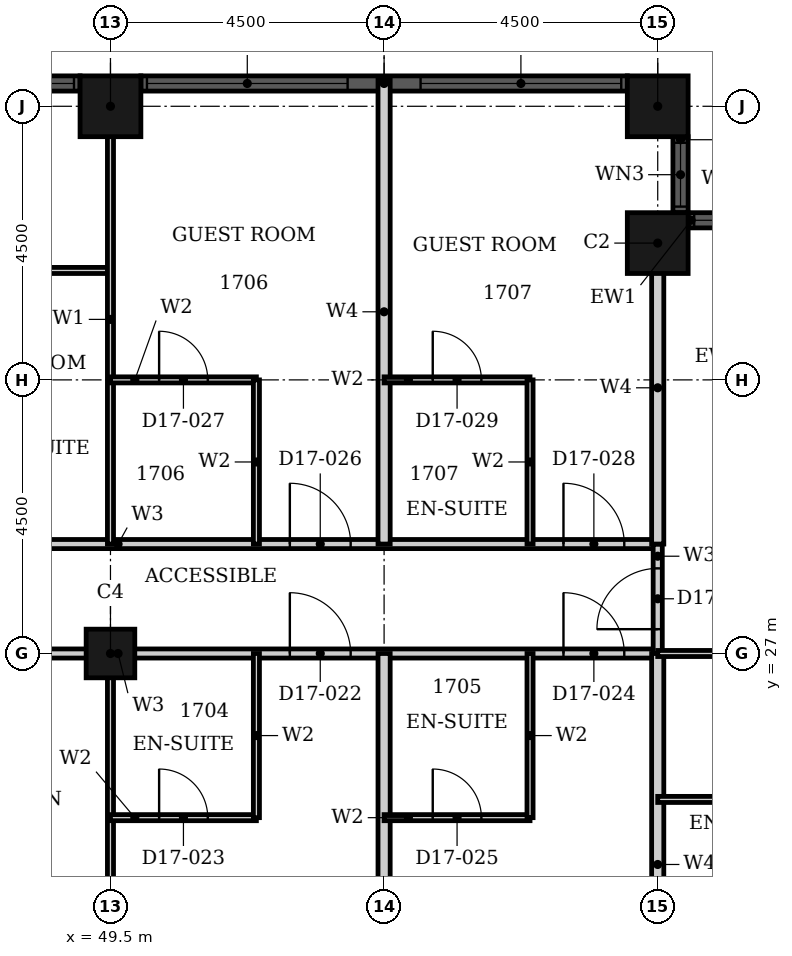
"""IFC4 building model, lengths in metres.
Left out: names, types, materials, properties, quantities, classifications, styles, units other than length and angle.
Written with IfcOpenShell. Run it as: python <this file> out.ifc"""

import sys

from ifc_helpers import new_model, si_unit, direction, frame, frame_2d, origin, origin_2d, place, context, subcontext, project, spatial, rectangle, hollow_rectangle, extrude, element, fill, save


model = new_model("IFC4")
c1 = context("Model", 3, precision=1e-05, world=origin(), true_north=direction((0.0, 1.0)))
c2 = subcontext(c1, "Body", "Model", "MODEL_VIEW")
j1 = project(units=[si_unit("LENGTHUNIT", "METRE"), si_unit("PLANEANGLEUNIT", "RADIAN")], contexts=[c1])
p1 = place(None, origin())
s1 = spatial("IfcSite", under=j1, at=p1, CompositionType="ELEMENT")
p2 = place(p1, origin())
s2 = spatial("IfcBuilding", under=s1, at=p2, CompositionType="ELEMENT")
p3 = place(p2, frame((0.0, 0.0, 74.4)))
s3 = spatial("IfcBuildingStorey", under=s2, at=p3, CompositionType="ELEMENT", Elevation=74.4)
for number, where, z_axis, x_axis in (
    (1, (58.5, 33.75, 0.0), (0.0, 0.0, 1.0), (1.0, 0.0, 0.0)),
    (2, (58.5, 36.0, 0.0), (0.0, 0.0, 1.0), (1.0, 0.0, 0.0)),
    (3, (49.5, 36.0, 0.0), (0.0, 0.0, 1.0), (1.0, 0.0, 0.0)),
):
    element("IfcColumn", number, at=place(p3, frame(where, z_axis=z_axis, x_axis=x_axis)), inside=s3, PredefinedType="COLUMN", context=c2, shape_type="SweptSolid", body=[
        extrude(hollow_rectangle(XDim=1.0, YDim=1.0, WallThickness=0.032, at=origin_2d()), origin(), (0.0, 0.0, 1.0), 3.6),
    ])
p4 = place(p3, frame((49.5, 27.0, 0.0), z_axis=(0.0, 0.0, 1.0), x_axis=(1.0, 0.0, 0.0)))
e4 = element("IfcColumn", 4, at=p4, inside=s3, PredefinedType="COLUMN", context=c2, shape_type="SweptSolid", body=[
    extrude(hollow_rectangle(XDim=0.8, YDim=0.8, WallThickness=0.025, at=origin_2d()), origin(), (0.0, 0.0, 1.0), 3.6),
])
p5 = place(p3, frame((60.25, 34.125, 0.0), z_axis=(0.0, 0.0, 1.0), x_axis=(-1.0, 0.0, 0.0)))
e5 = element("IfcWall", 5, at=p5, inside=s3, PredefinedType="SOLIDWALL", context=c2, shape_type="SweptSolid", body=[
    extrude(rectangle(XDim=1.25, YDim=0.25, at=frame_2d((0.625, 0.0))), origin(), (0.0, 0.0, 1.0), 3.6),
])
p6 = place(p5, frame((0.1, 0.0, 0.9)))
e6 = element("IfcOpeningElement", 6, at=p6, cuts=e5, PredefinedType="OPENING", context=c2, shape_type="SweptSolid", body=[
    extrude(rectangle(XDim=1.05, YDim=2.08, at=frame_2d((0.525, 1.04))), frame((0.0, 0.135, 0.0), z_axis=(0.0, -1.0, 0.0), x_axis=(1.0, 0.0, 0.0)), (0.0, 0.0, 1.0), 0.27),
])
p7 = place(p3, frame((58.875, 34.25, 0.0), z_axis=(0.0, 0.0, 1.0), x_axis=(0.0, 1.0, 0.0)))
e7 = element("IfcWall", 7, at=p7, inside=s3, PredefinedType="SOLIDWALL", context=c2, shape_type="SweptSolid", body=[
    extrude(rectangle(XDim=1.25, YDim=0.25, at=frame_2d((0.625, 0.0))), origin(), (0.0, 0.0, 1.0), 3.6),
])
p8 = place(p7, frame((0.1, 0.0, 0.9)))
e8 = element("IfcOpeningElement", 8, at=p8, cuts=e7, PredefinedType="OPENING", context=c2, shape_type="SweptSolid", body=[
    extrude(rectangle(XDim=1.05, YDim=2.08, at=frame_2d((0.525, 1.04))), frame((0.0, 0.135, 0.0), z_axis=(0.0, -1.0, 0.0), x_axis=(1.0, 0.0, 0.0)), (0.0, 0.0, 1.0), 0.27),
])
p9 = place(p3, frame((58.0, 36.375, 0.0), z_axis=(0.0, 0.0, 1.0), x_axis=(-1.0, 0.0, 0.0)))
e9 = element("IfcWall", 9, at=p9, inside=s3, PredefinedType="SOLIDWALL", context=c2, shape_type="SweptSolid", body=[
    extrude(rectangle(XDim=8.0, YDim=0.25, at=frame_2d((4.0, 0.0))), origin(), (0.0, 0.0, 1.0), 3.6),
])
p10 = place(p9, frame((0.1, 0.0, 0.9)))
e10 = element("IfcOpeningElement", 10, at=p10, cuts=e9, PredefinedType="OPENING", context=c2, shape_type="SweptSolid", body=[
    extrude(rectangle(XDim=3.3, YDim=2.08, at=frame_2d((1.65, 1.04))), frame((0.0, 0.135, 0.0), z_axis=(0.0, -1.0, 0.0), x_axis=(1.0, 0.0, 0.0)), (0.0, 0.0, 1.0), 0.27),
])
p11 = place(p9, frame((4.6, 0.0, 0.9)))
e11 = element("IfcOpeningElement", 11, at=p11, cuts=e9, PredefinedType="OPENING", context=c2, shape_type="SweptSolid", body=[
    extrude(rectangle(XDim=3.3, YDim=2.08, at=frame_2d((1.65, 1.04))), frame((0.0, 0.135, 0.0), z_axis=(0.0, -1.0, 0.0), x_axis=(1.0, 0.0, 0.0)), (0.0, 0.0, 1.0), 0.27),
])
p12 = place(p3, frame((49.0, 36.375, 0.0), z_axis=(0.0, 0.0, 1.0), x_axis=(-1.0, 0.0, 0.0)))
e12 = element("IfcWall", 12, at=p12, inside=s3, PredefinedType="SOLIDWALL", context=c2, shape_type="SweptSolid", body=[
    extrude(rectangle(XDim=1.25, YDim=0.25, at=frame_2d((0.625, 0.0))), origin(), (0.0, 0.0, 1.0), 3.6),
])
p13 = place(p12, frame((0.1, 0.0, 0.9)))
e13 = element("IfcOpeningElement", 13, at=p13, cuts=e12, PredefinedType="OPENING", context=c2, shape_type="SweptSolid", body=[
    extrude(rectangle(XDim=1.05, YDim=2.08, at=frame_2d((0.525, 1.04))), frame((0.0, 0.135, 0.0), z_axis=(0.0, -1.0, 0.0), x_axis=(1.0, 0.0, 0.0)), (0.0, 0.0, 1.0), 0.27),
])
p14 = place(p3, frame((46.8, 27.0, 0.0), z_axis=(0.0, 0.0, 1.0), x_axis=(1.0, 0.0, 0.0)))
e14 = element("IfcWall", 14, at=p14, inside=s3, PredefinedType="PARTITIONING", context=c2, shape_type="SweptSolid", body=[
    extrude(rectangle(XDim=11.7, YDim=0.15, at=frame_2d((5.85, 0.0))), origin(), (0.0, 0.0, 1.0), 2.58),
])
p15 = place(p14, frame((5.65, 0.0, 0.0)))
e15 = element("IfcOpeningElement", 15, at=p15, cuts=e14, PredefinedType="OPENING", context=c2, shape_type="SweptSolid", body=[
    extrude(rectangle(XDim=1.0, YDim=2.1, at=frame_2d((0.5, 1.05))), frame((0.0, 0.085, 0.0), z_axis=(0.0, -1.0, 0.0), x_axis=(1.0, 0.0, 0.0)), (0.0, 0.0, 1.0), 0.17),
])
p16 = place(p14, frame((10.15, 0.0, 0.0)))
e16 = element("IfcOpeningElement", 16, at=p16, cuts=e14, PredefinedType="OPENING", context=c2, shape_type="SweptSolid", body=[
    extrude(rectangle(XDim=1.0, YDim=2.1, at=frame_2d((0.5, 1.05))), frame((0.0, 0.085, 0.0), z_axis=(0.0, -1.0, 0.0), x_axis=(1.0, 0.0, 0.0)), (0.0, 0.0, 1.0), 0.17),
])
p17 = place(p3, frame((46.8, 28.8, 0.0), z_axis=(0.0, 0.0, 1.0), x_axis=(1.0, 0.0, 0.0)))
e17 = element("IfcWall", 17, at=p17, inside=s3, PredefinedType="PARTITIONING", context=c2, shape_type="SweptSolid", body=[
    extrude(rectangle(XDim=11.7, YDim=0.15, at=frame_2d((5.85, 0.0))), origin(), (0.0, 0.0, 1.0), 3.3),
])
p18 = place(p17, frame((5.65, 0.0, 0.0)))
e18 = element("IfcOpeningElement", 18, at=p18, cuts=e17, PredefinedType="OPENING", context=c2, shape_type="SweptSolid", body=[
    extrude(rectangle(XDim=1.0, YDim=2.1, at=frame_2d((0.5, 1.05))), frame((0.0, 0.085, 0.0), z_axis=(0.0, -1.0, 0.0), x_axis=(1.0, 0.0, 0.0)), (0.0, 0.0, 1.0), 0.17),
])
p19 = place(p17, frame((10.15, 0.0, 0.0)))
e19 = element("IfcOpeningElement", 19, at=p19, cuts=e17, PredefinedType="OPENING", context=c2, shape_type="SweptSolid", body=[
    extrude(rectangle(XDim=1.0, YDim=2.1, at=frame_2d((0.5, 1.05))), frame((0.0, 0.085, 0.0), z_axis=(0.0, -1.0, 0.0), x_axis=(1.0, 0.0, 0.0)), (0.0, 0.0, 1.0), 0.17),
])
p20 = place(p3, frame((58.5, 27.0, 0.0), z_axis=(0.0, 0.0, 1.0), x_axis=(0.0, 1.0, 0.0)))
e20 = element("IfcWall", 20, at=p20, inside=s3, PredefinedType="PARTITIONING", context=c2, shape_type="SweptSolid", body=[
    extrude(rectangle(XDim=1.8, YDim=0.15, at=frame_2d((0.9, 0.0))), origin(), (0.0, 0.0, 1.0), 3.3),
])
p21 = place(p20, frame((0.4, 0.0, 0.0)))
e21 = element("IfcOpeningElement", 21, at=p21, cuts=e20, PredefinedType="OPENING", context=c2, shape_type="SweptSolid", body=[
    extrude(rectangle(XDim=1.0, YDim=2.1, at=frame_2d((0.5, 1.05))), frame((0.0, 0.085, 0.0), z_axis=(0.0, -1.0, 0.0), x_axis=(1.0, 0.0, 0.0)), (0.0, 0.0, 1.0), 0.17),
])
p22 = place(p3, frame((46.8, 33.3, 0.0), z_axis=(0.0, 0.0, 1.0), x_axis=(1.0, 0.0, 0.0)))
e22 = element("IfcWall", 22, at=p22, inside=s3, PredefinedType="PARTITIONING", context=c2, shape_type="SweptSolid", body=[
    extrude(rectangle(XDim=2.7, YDim=0.1, at=frame_2d((1.35, 0.0))), origin(), (0.0, 0.0, 1.0), 3.3),
])
p23 = place(p3, frame((49.5, 28.8, 0.0), z_axis=(0.0, 0.0, 1.0), x_axis=(0.0, 1.0, 0.0)))
e23 = element("IfcWall", 23, at=p23, inside=s3, PredefinedType="PARTITIONING", context=c2, shape_type="SweptSolid", body=[
    extrude(rectangle(XDim=7.39, YDim=0.1, at=frame_2d((3.695, 0.0))), origin(), (0.0, 0.0, 1.0), 2.38),
])
p24 = place(p3, frame((49.5, 17.81, 0.0), z_axis=(0.0, 0.0, 1.0), x_axis=(0.0, 1.0, 0.0)))
e24 = element("IfcWall", 24, at=p24, inside=s3, PredefinedType="PARTITIONING", context=c2, shape_type="SweptSolid", body=[
    extrude(rectangle(XDim=9.19, YDim=0.1, at=frame_2d((4.595, 0.0))), origin(), (0.0, 0.0, 1.0), 2.38),
])
p25 = place(p3, frame((54.0, 28.8, 0.0), z_axis=(0.0, 0.0, 1.0), x_axis=(0.0, 1.0, 0.0)))
e25 = element("IfcWall", 25, at=p25, inside=s3, PredefinedType="PARTITIONING", context=c2, shape_type="SweptSolid", body=[
    extrude(rectangle(XDim=7.64, YDim=0.2, at=frame_2d((3.82, 0.0))), origin(), (0.0, 0.0, 1.0), 3.3),
])
p26 = place(p3, frame((54.0, 17.56, 0.0), z_axis=(0.0, 0.0, 1.0), x_axis=(0.0, 1.0, 0.0)))
e26 = element("IfcWall", 26, at=p26, inside=s3, PredefinedType="PARTITIONING", context=c2, shape_type="SweptSolid", body=[
    extrude(rectangle(XDim=9.44, YDim=0.2, at=frame_2d((4.72, 0.0))), origin(), (0.0, 0.0, 1.0), 3.3),
])
p27 = place(p3, frame((58.5, 28.8, 0.0), z_axis=(0.0, 0.0, 1.0), x_axis=(0.0, 1.0, 0.0)))
e27 = element("IfcWall", 27, at=p27, inside=s3, PredefinedType="PARTITIONING", context=c2, shape_type="SweptSolid", body=[
    extrude(rectangle(XDim=5.14, YDim=0.2, at=frame_2d((2.57, 0.0))), origin(), (0.0, 0.0, 1.0), 3.3),
])
p28 = place(p3, frame((58.5, 20.06, 0.0), z_axis=(0.0, 0.0, 1.0), x_axis=(0.0, 1.0, 0.0)))
e28 = element("IfcWall", 28, at=p28, inside=s3, PredefinedType="PARTITIONING", context=c2, shape_type="SweptSolid", body=[
    extrude(rectangle(XDim=6.94, YDim=0.2, at=frame_2d((3.47, 0.0))), origin(), (0.0, 0.0, 1.0), 3.3),
])
p29 = place(p3, frame((49.5, 24.3, 0.0), z_axis=(0.0, 0.0, 1.0), x_axis=(1.0, 0.0, 0.0)))
e29 = element("IfcWall", 29, at=p29, inside=s3, PredefinedType="PARTITIONING", context=c2, shape_type="SweptSolid", body=[
    extrude(rectangle(XDim=2.4, YDim=0.1, at=frame_2d((1.2, 0.0))), origin(), (0.0, 0.0, 1.0), 3.3),
])
p30 = place(p29, frame((0.8, 0.0, 0.0)))
e30 = element("IfcOpeningElement", 30, at=p30, cuts=e29, PredefinedType="OPENING", context=c2, shape_type="SweptSolid", body=[
    extrude(rectangle(XDim=0.8, YDim=2.1, at=frame_2d((0.4, 1.05))), frame((0.0, 0.06, 0.0), z_axis=(0.0, -1.0, 0.0), x_axis=(1.0, 0.0, 0.0)), (0.0, 0.0, 1.0), 0.12),
])
p31 = place(p3, frame((54.0, 24.3, 0.0), z_axis=(0.0, 0.0, 1.0), x_axis=(1.0, 0.0, 0.0)))
e31 = element("IfcWall", 31, at=p31, inside=s3, PredefinedType="PARTITIONING", context=c2, shape_type="SweptSolid", body=[
    extrude(rectangle(XDim=2.4, YDim=0.1, at=frame_2d((1.2, 0.0))), origin(), (0.0, 0.0, 1.0), 3.3),
])
p32 = place(p31, frame((0.8, 0.0, 0.0)))
e32 = element("IfcOpeningElement", 32, at=p32, cuts=e31, PredefinedType="OPENING", context=c2, shape_type="SweptSolid", body=[
    extrude(rectangle(XDim=0.8, YDim=2.1, at=frame_2d((0.4, 1.05))), frame((0.0, 0.06, 0.0), z_axis=(0.0, -1.0, 0.0), x_axis=(1.0, 0.0, 0.0)), (0.0, 0.0, 1.0), 0.12),
])
p33 = place(p3, frame((58.5, 24.6, 0.0), z_axis=(0.0, 0.0, 1.0), x_axis=(1.0, 0.0, 0.0)))
e33 = element("IfcWall", 33, at=p33, inside=s3, PredefinedType="PARTITIONING", context=c2, shape_type="SweptSolid", body=[
    extrude(rectangle(XDim=2.7, YDim=0.1, at=frame_2d((1.35, 0.0))), origin(), (0.0, 0.0, 1.0), 3.3),
])
p34 = place(p3, frame((58.5, 27.0, 0.0), z_axis=(0.0, 0.0, 1.0), x_axis=(1.0, 0.0, 0.0)))
e34 = element("IfcWall", 34, at=p34, inside=s3, PredefinedType="PARTITIONING", context=c2, shape_type="SweptSolid", body=[
    extrude(rectangle(XDim=2.7, YDim=0.1, at=frame_2d((1.35, 0.0))), origin(), (0.0, 0.0, 1.0), 2.58),
])
p35 = place(p3, frame((49.5, 31.5, 0.0), z_axis=(0.0, 0.0, 1.0), x_axis=(1.0, 0.0, 0.0)))
e35 = element("IfcWall", 35, at=p35, inside=s3, PredefinedType="PARTITIONING", context=c2, shape_type="SweptSolid", body=[
    extrude(rectangle(XDim=2.4, YDim=0.1, at=frame_2d((1.2, 0.0))), origin(), (0.0, 0.0, 1.0), 2.58),
])
p36 = place(p35, frame((0.8, 0.0, 0.0)))
e36 = element("IfcOpeningElement", 36, at=p36, cuts=e35, PredefinedType="OPENING", context=c2, shape_type="SweptSolid", body=[
    extrude(rectangle(XDim=0.8, YDim=2.1, at=frame_2d((0.4, 1.05))), frame((0.0, 0.06, 0.0), z_axis=(0.0, -1.0, 0.0), x_axis=(1.0, 0.0, 0.0)), (0.0, 0.0, 1.0), 0.12),
])
p37 = place(p3, frame((54.0, 31.5, 0.0), z_axis=(0.0, 0.0, 1.0), x_axis=(1.0, 0.0, 0.0)))
e37 = element("IfcWall", 37, at=p37, inside=s3, PredefinedType="PARTITIONING", context=c2, shape_type="SweptSolid", body=[
    extrude(rectangle(XDim=2.4, YDim=0.1, at=frame_2d((1.2, 0.0))), origin(), (0.0, 0.0, 1.0), 2.58),
])
p38 = place(p37, frame((0.8, 0.0, 0.0)))
e38 = element("IfcOpeningElement", 38, at=p38, cuts=e37, PredefinedType="OPENING", context=c2, shape_type="SweptSolid", body=[
    extrude(rectangle(XDim=0.8, YDim=2.1, at=frame_2d((0.4, 1.05))), frame((0.0, 0.06, 0.0), z_axis=(0.0, -1.0, 0.0), x_axis=(1.0, 0.0, 0.0)), (0.0, 0.0, 1.0), 0.12),
])
for number, where, z_axis, x_axis in (
    (39, (51.9, 28.8, 0.0), (0.0, 0.0, 1.0), (0.0, 1.0, 0.0)),
    (40, (51.9, 24.3, 0.0), (0.0, 0.0, 1.0), (0.0, 1.0, 0.0)),
    (41, (56.4, 28.8, 0.0), (0.0, 0.0, 1.0), (0.0, 1.0, 0.0)),
    (42, (56.4, 24.3, 0.0), (0.0, 0.0, 1.0), (0.0, 1.0, 0.0)),
):
    element("IfcWall", number, at=place(p3, frame(where, z_axis=z_axis, x_axis=x_axis)), inside=s3, PredefinedType="PARTITIONING", context=c2, shape_type="SweptSolid", body=[
        extrude(rectangle(XDim=2.7, YDim=0.1, at=frame_2d((1.35, 0.0))), origin(), (0.0, 0.0, 1.0), 3.3),
    ])
p39 = place(p6, origin())
e43 = element("IfcWindow", 43, at=p39, inside=s3, PartitioningType="SINGLE_PANEL", PredefinedType="WINDOW", context=c2, shape_type="SweptSolid", body=[
    extrude(rectangle(XDim=1.05, YDim=2.08, at=frame_2d((0.525, 1.04))), frame((0.0, 0.03, 0.0), z_axis=(0.0, -1.0, 0.0), x_axis=(1.0, 0.0, 0.0)), (0.0, 0.0, 1.0), 0.06),
])
fill(e6, e43)
p40 = place(p8, origin())
e44 = element("IfcWindow", 44, at=p40, inside=s3, PartitioningType="SINGLE_PANEL", PredefinedType="WINDOW", context=c2, shape_type="SweptSolid", body=[
    extrude(rectangle(XDim=1.05, YDim=2.08, at=frame_2d((0.525, 1.04))), frame((0.0, 0.03, 0.0), z_axis=(0.0, -1.0, 0.0), x_axis=(1.0, 0.0, 0.0)), (0.0, 0.0, 1.0), 0.06),
])
fill(e8, e44)
p41 = place(p10, origin())
e45 = element("IfcWindow", 45, at=p41, inside=s3, PartitioningType="SINGLE_PANEL", PredefinedType="WINDOW", context=c2, shape_type="SweptSolid", body=[
    extrude(rectangle(XDim=3.3, YDim=2.08, at=frame_2d((1.65, 1.04))), frame((0.0, 0.03, 0.0), z_axis=(0.0, -1.0, 0.0), x_axis=(1.0, 0.0, 0.0)), (0.0, 0.0, 1.0), 0.06),
])
fill(e10, e45)
p42 = place(p11, origin())
e46 = element("IfcWindow", 46, at=p42, inside=s3, PartitioningType="SINGLE_PANEL", PredefinedType="WINDOW", context=c2, shape_type="SweptSolid", body=[
    extrude(rectangle(XDim=3.3, YDim=2.08, at=frame_2d((1.65, 1.04))), frame((0.0, 0.03, 0.0), z_axis=(0.0, -1.0, 0.0), x_axis=(1.0, 0.0, 0.0)), (0.0, 0.0, 1.0), 0.06),
])
fill(e11, e46)
p43 = place(p13, origin())
e47 = element("IfcWindow", 47, at=p43, inside=s3, PartitioningType="SINGLE_PANEL", PredefinedType="WINDOW", context=c2, shape_type="SweptSolid", body=[
    extrude(rectangle(XDim=1.05, YDim=2.08, at=frame_2d((0.525, 1.04))), frame((0.0, 0.03, 0.0), z_axis=(0.0, -1.0, 0.0), x_axis=(1.0, 0.0, 0.0)), (0.0, 0.0, 1.0), 0.06),
])
fill(e13, e47)
p44 = place(p15, origin())
e48 = element("IfcDoor", 48, at=p44, inside=s3, OperationType="SINGLE_SWING_RIGHT", PredefinedType="DOOR", context=c2, shape_type="SweptSolid", body=[
    extrude(rectangle(XDim=1.0, YDim=2.1, at=frame_2d((0.5, 1.05))), frame((0.0, 0.025, 0.0), z_axis=(0.0, -1.0, 0.0), x_axis=(1.0, 0.0, 0.0)), (0.0, 0.0, 1.0), 0.05),
])
fill(e15, e48)
p45 = place(p30, origin())
e49 = element("IfcDoor", 49, at=p45, inside=s3, OperationType="SINGLE_SWING_RIGHT", PredefinedType="DOOR", context=c2, shape_type="SweptSolid", body=[
    extrude(rectangle(XDim=0.8, YDim=2.1, at=frame_2d((0.4, 1.05))), frame((0.0, 0.025, 0.0), z_axis=(0.0, -1.0, 0.0), x_axis=(1.0, 0.0, 0.0)), (0.0, 0.0, 1.0), 0.05),
])
fill(e30, e49)
p46 = place(p16, origin())
e50 = element("IfcDoor", 50, at=p46, inside=s3, OperationType="SINGLE_SWING_RIGHT", PredefinedType="DOOR", context=c2, shape_type="SweptSolid", body=[
    extrude(rectangle(XDim=1.0, YDim=2.1, at=frame_2d((0.5, 1.05))), frame((0.0, 0.025, 0.0), z_axis=(0.0, -1.0, 0.0), x_axis=(1.0, 0.0, 0.0)), (0.0, 0.0, 1.0), 0.05),
])
fill(e16, e50)
p47 = place(p32, origin())
e51 = element("IfcDoor", 51, at=p47, inside=s3, OperationType="SINGLE_SWING_LEFT", PredefinedType="DOOR", context=c2, shape_type="SweptSolid", body=[
    extrude(rectangle(XDim=0.8, YDim=2.1, at=frame_2d((0.4, 1.05))), frame((0.0, 0.025, 0.0), z_axis=(0.0, -1.0, 0.0), x_axis=(1.0, 0.0, 0.0)), (0.0, 0.0, 1.0), 0.05),
])
fill(e32, e51)
p48 = place(p18, origin())
e52 = element("IfcDoor", 52, at=p48, inside=s3, OperationType="SINGLE_SWING_RIGHT", PredefinedType="DOOR", context=c2, shape_type="SweptSolid", body=[
    extrude(rectangle(XDim=1.0, YDim=2.1, at=frame_2d((0.5, 1.05))), frame((0.0, 0.025, 0.0), z_axis=(0.0, -1.0, 0.0), x_axis=(1.0, 0.0, 0.0)), (0.0, 0.0, 1.0), 0.05),
])
fill(e18, e52)
p49 = place(p36, origin())
e53 = element("IfcDoor", 53, at=p49, inside=s3, OperationType="SINGLE_SWING_LEFT", PredefinedType="DOOR", context=c2, shape_type="SweptSolid", body=[
    extrude(rectangle(XDim=0.8, YDim=2.1, at=frame_2d((0.4, 1.05))), frame((0.0, 0.025, 0.0), z_axis=(0.0, -1.0, 0.0), x_axis=(1.0, 0.0, 0.0)), (0.0, 0.0, 1.0), 0.05),
])
fill(e36, e53)
p50 = place(p19, origin())
e54 = element("IfcDoor", 54, at=p50, inside=s3, OperationType="SINGLE_SWING_RIGHT", PredefinedType="DOOR", context=c2, shape_type="SweptSolid", body=[
    extrude(rectangle(XDim=1.0, YDim=2.1, at=frame_2d((0.5, 1.05))), frame((0.0, 0.025, 0.0), z_axis=(0.0, -1.0, 0.0), x_axis=(1.0, 0.0, 0.0)), (0.0, 0.0, 1.0), 0.05),
])
fill(e19, e54)
p51 = place(p38, origin())
e55 = element("IfcDoor", 55, at=p51, inside=s3, OperationType="SINGLE_SWING_LEFT", PredefinedType="DOOR", context=c2, shape_type="SweptSolid", body=[
    extrude(rectangle(XDim=0.8, YDim=2.1, at=frame_2d((0.4, 1.05))), frame((0.0, 0.025, 0.0), z_axis=(0.0, -1.0, 0.0), x_axis=(1.0, 0.0, 0.0)), (0.0, 0.0, 1.0), 0.05),
])
fill(e38, e55)
p52 = place(p21, origin())
e56 = element("IfcDoor", 56, at=p52, inside=s3, OperationType="SINGLE_SWING_RIGHT", PredefinedType="DOOR", context=c2, shape_type="SweptSolid", body=[
    extrude(rectangle(XDim=1.0, YDim=2.1, at=frame_2d((0.5, 1.05))), frame((0.0, 0.025, 0.0), z_axis=(0.0, -1.0, 0.0), x_axis=(1.0, 0.0, 0.0)), (0.0, 0.0, 1.0), 0.05),
])
fill(e21, e56)
save(model, sys.argv[1])
